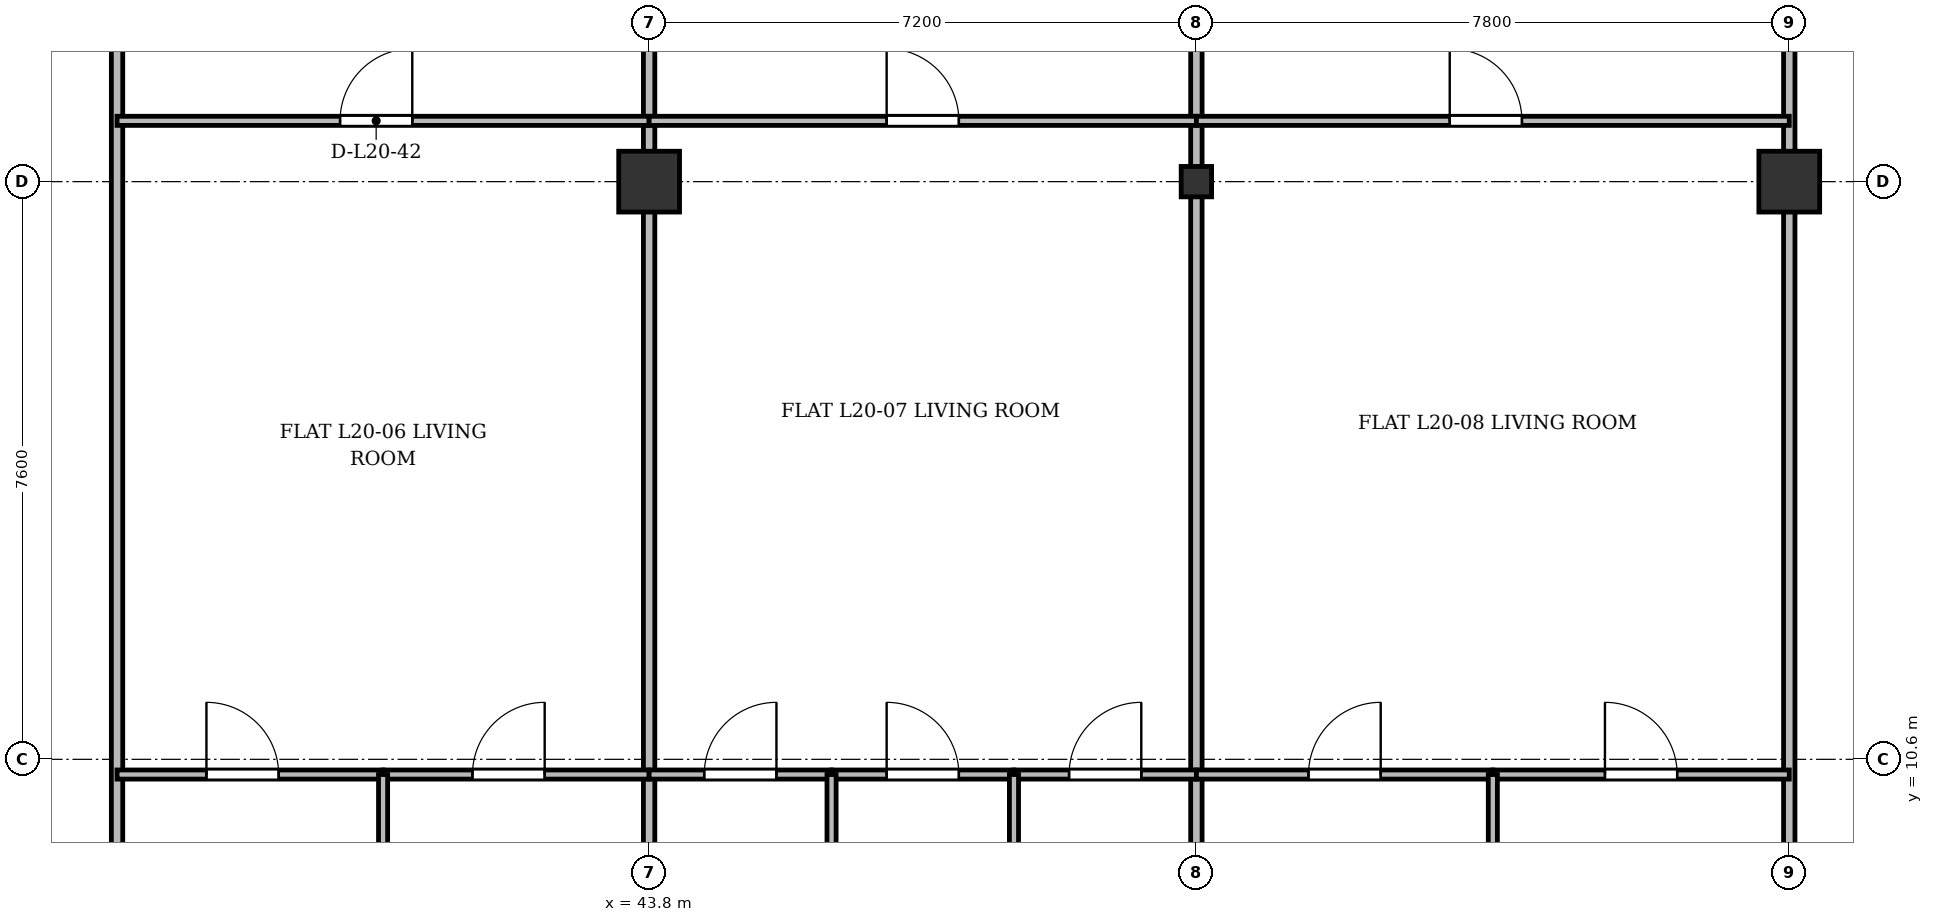
"""IFC4 building model, lengths in metres.
Left out: names, types, materials, properties, quantities, classifications, styles, units other than length and angle.
Written with IfcOpenShell. Run it as: python <this file> out.ifc"""

import sys

from ifc_helpers import new_model, si_unit, direction, frame, frame_2d, origin, origin_2d, place, context, subcontext, project, spatial, rectangle, i_section, extrude, source, transform, mapped, element, fill, save


model = new_model("IFC4")
c1 = context("Model", 3, precision=1e-05, world=origin(), true_north=direction((0.0, 1.0)))
c2 = subcontext(c1, "Body", "Model", "MODEL_VIEW")
j1 = project(units=[si_unit("LENGTHUNIT", "METRE"), si_unit("PLANEANGLEUNIT", "RADIAN")], contexts=[c1])
p1 = place(None, origin())
s1 = spatial("IfcSite", under=j1, at=p1, CompositionType="ELEMENT")
p2 = place(p1, origin())
s2 = spatial("IfcBuilding", under=s1, at=p2, CompositionType="ELEMENT")
p3 = place(p2, frame((0.0, 0.0, 81.7)))
s3 = spatial("IfcBuildingStorey", under=s2, at=p3, CompositionType="ELEMENT", Elevation=81.7)
m1 = source(origin(), c2, "Body", "SweptSolid", [
    extrude(rectangle(XDim=0.8, YDim=0.8, at=origin_2d()), origin(), (0.0, 0.0, 1.0), 3.6),
])
p4 = place(p3, frame((43.8, 18.2, 0.0), z_axis=(0.0, 0.0, 1.0), x_axis=(1.0, 0.0, 0.0)))
e1 = element("IfcColumn", 1, at=p4, inside=s3, PredefinedType="COLUMN", context=c2, shape_type="MappedRepresentation", body=[
    mapped(m1, transform((0.0, 0.0, 0.0), x_axis=(1.0, 0.0, 0.0), y_axis=(0.0, 1.0, 0.0), z_axis=(0.0, 0.0, 1.0), scale=1.0)),
])
m2 = source(origin(), c2, "Body", "SweptSolid", [
    extrude(i_section(OverallWidth=0.4, OverallDepth=0.4, WebThickness=0.022, FlangeThickness=0.035, at=origin_2d()), origin(), (0.0, 0.0, 1.0), 3.6),
])
p5 = place(p3, frame((51.0, 18.2, 0.0), z_axis=(0.0, 0.0, 1.0), x_axis=(1.0, 0.0, 0.0)))
e2 = element("IfcColumn", 2, at=p5, inside=s3, PredefinedType="COLUMN", context=c2, shape_type="MappedRepresentation", body=[
    mapped(m2, transform((0.0, 0.0, 0.0), x_axis=(1.0, 0.0, 0.0), y_axis=(0.0, 1.0, 0.0), z_axis=(0.0, 0.0, 1.0), scale=1.0)),
])
p6 = place(p3, frame((58.8, 18.2, 0.0), z_axis=(0.0, 0.0, 1.0), x_axis=(1.0, 0.0, 0.0)))
e3 = element("IfcColumn", 3, at=p6, inside=s3, PredefinedType="COLUMN", context=c2, shape_type="MappedRepresentation", body=[
    mapped(m1, transform((0.0, 0.0, 0.0), x_axis=(1.0, 0.0, 0.0), y_axis=(0.0, 1.0, 0.0), z_axis=(0.0, 0.0, 1.0), scale=1.0)),
])
p7 = place(p3, frame((36.8, 3.145, 0.0), z_axis=(0.0, 0.0, 1.0), x_axis=(0.0, 1.0, 0.0)))
e4 = element("IfcWall", 4, at=p7, inside=s3, PredefinedType="PARTITIONING", context=c2, shape_type="SweptSolid", body=[
    extrude(rectangle(XDim=24.455, YDim=0.15, at=frame_2d((12.228, 0.0))), origin(), (0.0, 0.0, 1.0), 2.752),
])
for number, where, z_axis, x_axis in (
    (5, (43.8, 3.145, 0.0), (0.0, 0.0, 1.0), (0.0, 1.0, 0.0)),
    (6, (51.0, 3.145, 0.0), (0.0, 0.0, 1.0), (0.0, 1.0, 0.0)),
    (7, (58.8, 3.145, 0.0), (0.0, 0.0, 1.0), (0.0, 1.0, 0.0)),
):
    element("IfcWall", number, at=place(p3, frame(where, z_axis=z_axis, x_axis=x_axis)), inside=s3, PredefinedType="PARTITIONING", context=c2, shape_type="SweptSolid", body=[
        extrude(rectangle(XDim=24.455, YDim=0.15, at=frame_2d((12.228, 0.0))), origin(), (0.0, 0.0, 1.0), 2.84),
    ])
p8 = place(p3, frame((36.8, 19.0, 0.0), z_axis=(0.0, 0.0, 1.0), x_axis=(1.0, 0.0, 0.0)))
e8 = element("IfcWall", 8, at=p8, inside=s3, PredefinedType="PARTITIONING", context=c2, shape_type="SweptSolid", body=[
    extrude(rectangle(XDim=7.0, YDim=0.12, at=frame_2d((3.5, 0.0))), origin(), (0.0, 0.0, 1.0), 2.84),
])
p9 = place(p8, frame((2.934, 0.0, 0.0)))
e9 = element("IfcOpeningElement", 9, at=p9, cuts=e8, PredefinedType="OPENING", context=c2, shape_type="SweptSolid", body=[
    extrude(rectangle(XDim=0.95, YDim=2.15, at=frame_2d((0.475, 1.075))), frame((0.0, 0.07, 0.0), z_axis=(0.0, -1.0, 0.0), x_axis=(1.0, 0.0, 0.0)), (0.0, 0.0, 1.0), 0.14),
])
p10 = place(p3, frame((36.8, 10.4, 0.0), z_axis=(0.0, 0.0, 1.0), x_axis=(1.0, 0.0, 0.0)))
e10 = element("IfcWall", 10, at=p10, inside=s3, PredefinedType="PARTITIONING", context=c2, shape_type="SweptSolid", body=[
    extrude(rectangle(XDim=3.5, YDim=0.12, at=frame_2d((1.75, 0.0))), origin(), (0.0, 0.0, 1.0), 3.34),
])
p11 = place(p10, frame((1.176, 0.0, 0.0)))
e11 = element("IfcOpeningElement", 11, at=p11, cuts=e10, PredefinedType="OPENING", context=c2, shape_type="SweptSolid", body=[
    extrude(rectangle(XDim=0.95, YDim=2.15, at=frame_2d((0.475, 1.075))), frame((0.0, 0.07, 0.0), z_axis=(0.0, -1.0, 0.0), x_axis=(1.0, 0.0, 0.0)), (0.0, 0.0, 1.0), 0.14),
])
p12 = place(p3, frame((40.3, 10.4, 0.0), z_axis=(0.0, 0.0, 1.0), x_axis=(1.0, 0.0, 0.0)))
e12 = element("IfcWall", 12, at=p12, inside=s3, PredefinedType="PARTITIONING", context=c2, shape_type="SweptSolid", body=[
    extrude(rectangle(XDim=3.5, YDim=0.12, at=frame_2d((1.75, 0.0))), origin(), (0.0, 0.0, 1.0), 2.84),
])
p13 = place(p12, frame((1.176, 0.0, 0.0)))
e13 = element("IfcOpeningElement", 13, at=p13, cuts=e12, PredefinedType="OPENING", context=c2, shape_type="SweptSolid", body=[
    extrude(rectangle(XDim=0.95, YDim=2.15, at=frame_2d((0.475, 1.075))), frame((0.0, 0.07, 0.0), z_axis=(0.0, -1.0, 0.0), x_axis=(1.0, 0.0, 0.0)), (0.0, 0.0, 1.0), 0.14),
])
p14 = place(p3, frame((40.3, 3.145, 0.0), z_axis=(0.0, 0.0, 1.0), x_axis=(0.0, 1.0, 0.0)))
e14 = element("IfcWall", 14, at=p14, inside=s3, PredefinedType="PARTITIONING", context=c2, shape_type="SweptSolid", body=[
    extrude(rectangle(XDim=7.255, YDim=0.12, at=frame_2d((3.627, 0.0))), origin(), (0.0, 0.0, 1.0), 2.752),
])
p15 = place(p3, frame((43.8, 19.0, 0.0), z_axis=(0.0, 0.0, 1.0), x_axis=(1.0, 0.0, 0.0)))
e15 = element("IfcWall", 15, at=p15, inside=s3, PredefinedType="PARTITIONING", context=c2, shape_type="SweptSolid", body=[
    extrude(rectangle(XDim=7.2, YDim=0.12, at=frame_2d((3.6, 0.0))), origin(), (0.0, 0.0, 1.0), 2.84),
])
p16 = place(p15, frame((3.125, 0.0, 0.0)))
e16 = element("IfcOpeningElement", 16, at=p16, cuts=e15, PredefinedType="OPENING", context=c2, shape_type="SweptSolid", body=[
    extrude(rectangle(XDim=0.95, YDim=2.15, at=frame_2d((0.475, 1.075))), frame((0.0, 0.07, 0.0), z_axis=(0.0, -1.0, 0.0), x_axis=(1.0, 0.0, 0.0)), (0.0, 0.0, 1.0), 0.14),
])
p17 = place(p3, frame((43.8, 10.4, 0.0), z_axis=(0.0, 0.0, 1.0), x_axis=(1.0, 0.0, 0.0)))
e17 = element("IfcWall", 17, at=p17, inside=s3, PredefinedType="PARTITIONING", context=c2, shape_type="SweptSolid", body=[
    extrude(rectangle(XDim=2.4, YDim=0.12, at=frame_2d((1.2, 0.0))), origin(), (0.0, 0.0, 1.0), 2.84),
])
p18 = place(p17, frame((0.725, 0.0, 0.0)))
e18 = element("IfcOpeningElement", 18, at=p18, cuts=e17, PredefinedType="OPENING", context=c2, shape_type="SweptSolid", body=[
    extrude(rectangle(XDim=0.95, YDim=2.15, at=frame_2d((0.475, 1.075))), frame((0.0, 0.07, 0.0), z_axis=(0.0, -1.0, 0.0), x_axis=(1.0, 0.0, 0.0)), (0.0, 0.0, 1.0), 0.14),
])
p19 = place(p3, frame((46.2, 10.4, 0.0), z_axis=(0.0, 0.0, 1.0), x_axis=(1.0, 0.0, 0.0)))
e19 = element("IfcWall", 19, at=p19, inside=s3, PredefinedType="PARTITIONING", context=c2, shape_type="SweptSolid", body=[
    extrude(rectangle(XDim=2.4, YDim=0.12, at=frame_2d((1.2, 0.0))), origin(), (0.0, 0.0, 1.0), 3.34),
])
p20 = place(p19, frame((0.725, 0.0, 0.0)))
e20 = element("IfcOpeningElement", 20, at=p20, cuts=e19, PredefinedType="OPENING", context=c2, shape_type="SweptSolid", body=[
    extrude(rectangle(XDim=0.95, YDim=2.15, at=frame_2d((0.475, 1.075))), frame((0.0, 0.07, 0.0), z_axis=(0.0, -1.0, 0.0), x_axis=(1.0, 0.0, 0.0)), (0.0, 0.0, 1.0), 0.14),
])
p21 = place(p3, frame((46.2, 3.145, 0.0), z_axis=(0.0, 0.0, 1.0), x_axis=(0.0, 1.0, 0.0)))
e21 = element("IfcWall", 21, at=p21, inside=s3, PredefinedType="PARTITIONING", context=c2, shape_type="SweptSolid", body=[
    extrude(rectangle(XDim=7.255, YDim=0.12, at=frame_2d((3.627, 0.0))), origin(), (0.0, 0.0, 1.0), 2.752),
])
p22 = place(p3, frame((48.6, 10.4, 0.0), z_axis=(0.0, 0.0, 1.0), x_axis=(1.0, 0.0, 0.0)))
e22 = element("IfcWall", 22, at=p22, inside=s3, PredefinedType="PARTITIONING", context=c2, shape_type="SweptSolid", body=[
    extrude(rectangle(XDim=2.4, YDim=0.12, at=frame_2d((1.2, 0.0))), origin(), (0.0, 0.0, 1.0), 2.84),
])
p23 = place(p22, frame((0.725, 0.0, 0.0)))
e23 = element("IfcOpeningElement", 23, at=p23, cuts=e22, PredefinedType="OPENING", context=c2, shape_type="SweptSolid", body=[
    extrude(rectangle(XDim=0.95, YDim=2.15, at=frame_2d((0.475, 1.075))), frame((0.0, 0.07, 0.0), z_axis=(0.0, -1.0, 0.0), x_axis=(1.0, 0.0, 0.0)), (0.0, 0.0, 1.0), 0.14),
])
p24 = place(p3, frame((48.6, 3.145, 0.0), z_axis=(0.0, 0.0, 1.0), x_axis=(0.0, 1.0, 0.0)))
e24 = element("IfcWall", 24, at=p24, inside=s3, PredefinedType="PARTITIONING", context=c2, shape_type="SweptSolid", body=[
    extrude(rectangle(XDim=7.255, YDim=0.12, at=frame_2d((3.627, 0.0))), origin(), (0.0, 0.0, 1.0), 2.752),
])
p25 = place(p3, frame((51.0, 19.0, 0.0), z_axis=(0.0, 0.0, 1.0), x_axis=(1.0, 0.0, 0.0)))
e25 = element("IfcWall", 25, at=p25, inside=s3, PredefinedType="PARTITIONING", context=c2, shape_type="SweptSolid", body=[
    extrude(rectangle(XDim=7.8, YDim=0.12, at=frame_2d((3.9, 0.0))), origin(), (0.0, 0.0, 1.0), 2.84),
])
p26 = place(p25, frame((3.333, 0.0, 0.0)))
e26 = element("IfcOpeningElement", 26, at=p26, cuts=e25, PredefinedType="OPENING", context=c2, shape_type="SweptSolid", body=[
    extrude(rectangle(XDim=0.95, YDim=2.15, at=frame_2d((0.475, 1.075))), frame((0.0, 0.07, 0.0), z_axis=(0.0, -1.0, 0.0), x_axis=(1.0, 0.0, 0.0)), (0.0, 0.0, 1.0), 0.14),
])
p27 = place(p3, frame((51.0, 10.4, 0.0), z_axis=(0.0, 0.0, 1.0), x_axis=(1.0, 0.0, 0.0)))
e27 = element("IfcWall", 27, at=p27, inside=s3, PredefinedType="PARTITIONING", context=c2, shape_type="SweptSolid", body=[
    extrude(rectangle(XDim=3.9, YDim=0.12, at=frame_2d((1.95, 0.0))), origin(), (0.0, 0.0, 1.0), 2.84),
])
p28 = place(p27, frame((1.475, 0.0, 0.0)))
e28 = element("IfcOpeningElement", 28, at=p28, cuts=e27, PredefinedType="OPENING", context=c2, shape_type="SweptSolid", body=[
    extrude(rectangle(XDim=0.95, YDim=2.15, at=frame_2d((0.475, 1.075))), frame((0.0, 0.07, 0.0), z_axis=(0.0, -1.0, 0.0), x_axis=(1.0, 0.0, 0.0)), (0.0, 0.0, 1.0), 0.14),
])
p29 = place(p3, frame((54.9, 10.4, 0.0), z_axis=(0.0, 0.0, 1.0), x_axis=(1.0, 0.0, 0.0)))
e29 = element("IfcWall", 29, at=p29, inside=s3, PredefinedType="PARTITIONING", context=c2, shape_type="SweptSolid", body=[
    extrude(rectangle(XDim=3.9, YDim=0.12, at=frame_2d((1.95, 0.0))), origin(), (0.0, 0.0, 1.0), 2.84),
])
p30 = place(p29, frame((1.475, 0.0, 0.0)))
e30 = element("IfcOpeningElement", 30, at=p30, cuts=e29, PredefinedType="OPENING", context=c2, shape_type="SweptSolid", body=[
    extrude(rectangle(XDim=0.95, YDim=2.15, at=frame_2d((0.475, 1.075))), frame((0.0, 0.07, 0.0), z_axis=(0.0, -1.0, 0.0), x_axis=(1.0, 0.0, 0.0)), (0.0, 0.0, 1.0), 0.14),
])
p31 = place(p3, frame((54.9, 3.145, 0.0), z_axis=(0.0, 0.0, 1.0), x_axis=(0.0, 1.0, 0.0)))
e31 = element("IfcWall", 31, at=p31, inside=s3, PredefinedType="PARTITIONING", context=c2, shape_type="SweptSolid", body=[
    extrude(rectangle(XDim=7.255, YDim=0.12, at=frame_2d((3.627, 0.0))), origin(), (0.0, 0.0, 1.0), 2.752),
])
m3 = source(origin(), c2, "Body", "SweptSolid", [
    extrude(rectangle(XDim=0.95, YDim=2.15, at=frame_2d((0.475, 1.075))), frame((0.0, 0.025, 0.0), z_axis=(0.0, -1.0, 0.0), x_axis=(1.0, 0.0, 0.0)), (0.0, 0.0, 1.0), 0.05),
])
p32 = place(p9, origin())
e32 = element("IfcDoor", 32, at=p32, inside=s3, OperationType="SINGLE_SWING_RIGHT", PredefinedType="DOOR", context=c2, shape_type="MappedRepresentation", body=[
    mapped(m3, transform((0.0, 0.0, 0.0), x_axis=(1.0, 0.0, 0.0), y_axis=(0.0, 1.0, 0.0), z_axis=(0.0, 0.0, 1.0), scale=1.0)),
])
fill(e9, e32)
p33 = place(p11, origin())
e33 = element("IfcDoor", 33, at=p33, inside=s3, OperationType="SINGLE_SWING_LEFT", PredefinedType="DOOR", context=c2, shape_type="MappedRepresentation", body=[
    mapped(m3, transform((0.0, 0.0, 0.0), x_axis=(1.0, 0.0, 0.0), y_axis=(0.0, 1.0, 0.0), z_axis=(0.0, 0.0, 1.0), scale=1.0)),
])
fill(e11, e33)
p34 = place(p13, origin())
e34 = element("IfcDoor", 34, at=p34, inside=s3, OperationType="SINGLE_SWING_RIGHT", PredefinedType="DOOR", context=c2, shape_type="MappedRepresentation", body=[
    mapped(m3, transform((0.0, 0.0, 0.0), x_axis=(1.0, 0.0, 0.0), y_axis=(0.0, 1.0, 0.0), z_axis=(0.0, 0.0, 1.0), scale=1.0)),
])
fill(e13, e34)
p35 = place(p16, origin())
e35 = element("IfcDoor", 35, at=p35, inside=s3, OperationType="SINGLE_SWING_LEFT", PredefinedType="DOOR", context=c2, shape_type="MappedRepresentation", body=[
    mapped(m3, transform((0.0, 0.0, 0.0), x_axis=(1.0, 0.0, 0.0), y_axis=(0.0, 1.0, 0.0), z_axis=(0.0, 0.0, 1.0), scale=1.0)),
])
fill(e16, e35)
p36 = place(p18, origin())
e36 = element("IfcDoor", 36, at=p36, inside=s3, OperationType="SINGLE_SWING_RIGHT", PredefinedType="DOOR", context=c2, shape_type="MappedRepresentation", body=[
    mapped(m3, transform((0.0, 0.0, 0.0), x_axis=(1.0, 0.0, 0.0), y_axis=(0.0, 1.0, 0.0), z_axis=(0.0, 0.0, 1.0), scale=1.0)),
])
fill(e18, e36)
p37 = place(p20, origin())
e37 = element("IfcDoor", 37, at=p37, inside=s3, OperationType="SINGLE_SWING_LEFT", PredefinedType="DOOR", context=c2, shape_type="MappedRepresentation", body=[
    mapped(m3, transform((0.0, 0.0, 0.0), x_axis=(1.0, 0.0, 0.0), y_axis=(0.0, 1.0, 0.0), z_axis=(0.0, 0.0, 1.0), scale=1.0)),
])
fill(e20, e37)
p38 = place(p23, origin())
e38 = element("IfcDoor", 38, at=p38, inside=s3, OperationType="SINGLE_SWING_RIGHT", PredefinedType="DOOR", context=c2, shape_type="MappedRepresentation", body=[
    mapped(m3, transform((0.0, 0.0, 0.0), x_axis=(1.0, 0.0, 0.0), y_axis=(0.0, 1.0, 0.0), z_axis=(0.0, 0.0, 1.0), scale=1.0)),
])
fill(e23, e38)
p39 = place(p26, origin())
e39 = element("IfcDoor", 39, at=p39, inside=s3, OperationType="SINGLE_SWING_LEFT", PredefinedType="DOOR", context=c2, shape_type="MappedRepresentation", body=[
    mapped(m3, transform((0.0, 0.0, 0.0), x_axis=(1.0, 0.0, 0.0), y_axis=(0.0, 1.0, 0.0), z_axis=(0.0, 0.0, 1.0), scale=1.0)),
])
fill(e26, e39)
p40 = place(p28, origin())
e40 = element("IfcDoor", 40, at=p40, inside=s3, OperationType="SINGLE_SWING_RIGHT", PredefinedType="DOOR", context=c2, shape_type="MappedRepresentation", body=[
    mapped(m3, transform((0.0, 0.0, 0.0), x_axis=(1.0, 0.0, 0.0), y_axis=(0.0, 1.0, 0.0), z_axis=(0.0, 0.0, 1.0), scale=1.0)),
])
fill(e28, e40)
p41 = place(p30, origin())
e41 = element("IfcDoor", 41, at=p41, inside=s3, OperationType="SINGLE_SWING_LEFT", PredefinedType="DOOR", context=c2, shape_type="MappedRepresentation", body=[
    mapped(m3, transform((0.0, 0.0, 0.0), x_axis=(1.0, 0.0, 0.0), y_axis=(0.0, 1.0, 0.0), z_axis=(0.0, 0.0, 1.0), scale=1.0)),
])
fill(e30, e41)
save(model, sys.argv[1])
